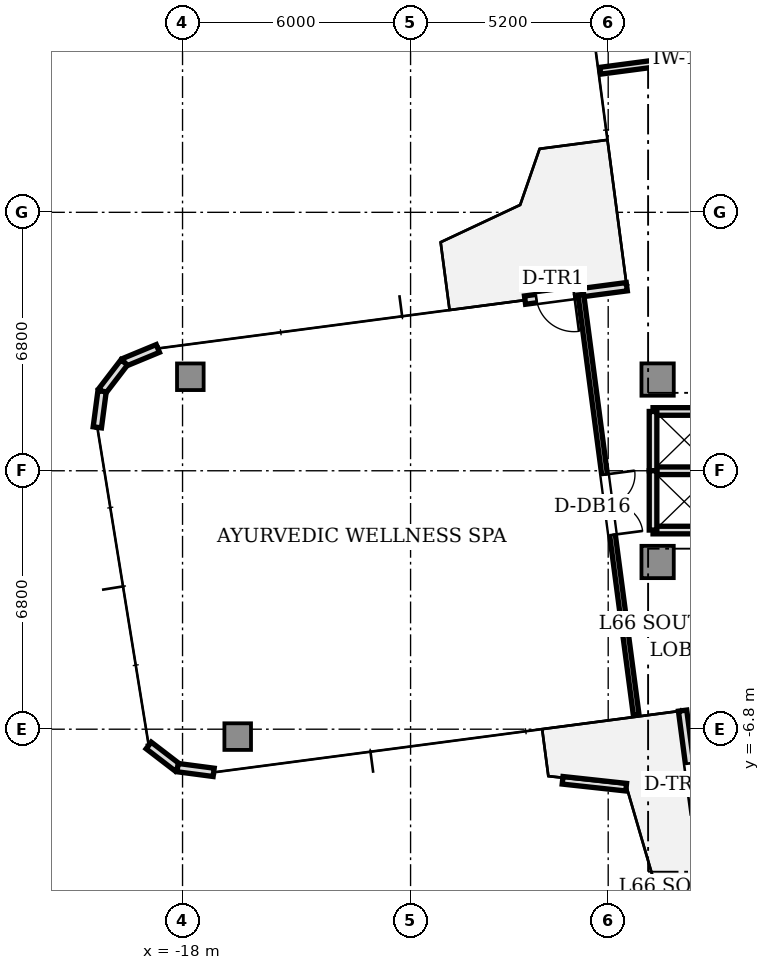
"""IFC4 building model, lengths in metres.
Left out: names, types, materials, properties, quantities, classifications, styles, units other than length and angle.
Written with IfcOpenShell. Run it as: python <this file> out.ifc"""

import sys

from ifc_helpers import new_model, si_unit, direction, frame, frame_2d, origin, origin_2d, place, context, subcontext, project, spatial, rectangle, extrude, source, transform, mapped, element, fill, save


model = new_model("IFC4")
c1 = context("Model", 3, precision=1e-05, world=origin(), true_north=direction((0.0, 1.0)))
c2 = subcontext(c1, "Body", "Model", "MODEL_VIEW")
j1 = project(units=[si_unit("LENGTHUNIT", "METRE"), si_unit("PLANEANGLEUNIT", "RADIAN")], contexts=[c1])
p1 = place(None, origin())
s1 = spatial("IfcSite", under=j1, at=p1, CompositionType="ELEMENT")
p2 = place(p1, origin())
s2 = spatial("IfcBuilding", under=s1, at=p2, CompositionType="ELEMENT")
p3 = place(p2, frame((0.0, 0.0, 237.8)))
s3 = spatial("IfcBuildingStorey", under=s2, at=p3, CompositionType="ELEMENT", Elevation=237.8)
m1 = source(origin(), c2, "Body", "SweptSolid", [
    extrude(rectangle(XDim=0.85, YDim=0.85, at=origin_2d()), origin(), (0.0, 0.0, 1.0), 3.11),
])
for number, where, z_axis, x_axis in (
    (1, (-5.5, 2.4, 0.0), (0.0, 0.0, 1.0), (1.0, 0.0, 0.0)),
    (2, (-5.5, -2.4, 0.0), (0.0, 0.0, 1.0), (1.0, 0.0, 0.0)),
):
    element("IfcColumn", number, at=place(p3, frame(where, z_axis=z_axis, x_axis=x_axis)), inside=s3, PredefinedType="COLUMN", context=c2, shape_type="MappedRepresentation", body=[
        mapped(m1, transform((0.0, 0.0, 0.0), scale=1.0)),
    ])
m2 = source(origin(), c2, "Body", "SweptSolid", [
    extrude(rectangle(XDim=0.7, YDim=0.7, at=origin_2d()), origin(), (0.0, 0.0, 1.0), 3.11),
])
for number, where, z_axis, x_axis in (
    (3, (-17.795, 2.473, 0.0), (0.0, 0.0, 1.0), (1.0, 0.0, 0.0)),
    (4, (-16.549, -6.995, 0.0), (0.0, 0.0, 1.0), (1.0, 0.0, 0.0)),
):
    element("IfcColumn", number, at=place(p3, frame(where, z_axis=z_axis, x_axis=x_axis)), inside=s3, PredefinedType="COLUMN", context=c2, shape_type="MappedRepresentation", body=[
        mapped(m2, transform((0.0, 0.0, 0.0), scale=1.0)),
    ])
p4 = place(p3, frame((-6.311, 4.843, 0.0), z_axis=(0.0, 0.0, 1.0), x_axis=(-0.991439824936, -0.130564442062, 0.0)))
e5 = element("IfcWall", 5, at=p4, inside=s3, PredefinedType="STANDARD", context=c2, shape_type="SweptSolid", body=[
    extrude(rectangle(XDim=2.7, YDim=0.22, at=frame_2d((1.35, 0.0))), origin(), (0.0, 0.0, 1.0), 3.11),
])
p5 = place(p4, frame((1.4, 0.0, 0.0)))
e6 = element("IfcOpeningElement", 6, at=p5, cuts=e5, PredefinedType="OPENING", context=c2, shape_type="SweptSolid", body=[
    extrude(rectangle(XDim=1.0, YDim=2.2, at=frame_2d((0.5, 1.1))), frame((0.0, 0.12, 0.0), z_axis=(0.0, -1.0, 0.0), x_axis=(1.0, 0.0, 0.0)), (0.0, 0.0, 1.0), 0.24),
])
p6 = place(p3, frame((-18.65, 3.218, 0.0), z_axis=(0.0, 0.0, 1.0), x_axis=(-0.923889442397, -0.382659506909, 0.0)))
e7 = element("IfcWall", 7, at=p6, inside=s3, PredefinedType="STANDARD", context=c2, shape_type="SweptSolid", body=[
    extrude(rectangle(XDim=0.958, YDim=0.22, at=frame_2d((0.479, 0.0))), origin(), (0.0, 0.0, 1.0), 3.11),
])
p7 = place(p3, frame((-19.534, 2.852, 0.0), z_axis=(0.0, 0.0, 1.0), x_axis=(-0.60861352168, -0.793466811674, 0.0)))
e8 = element("IfcWall", 8, at=p7, inside=s3, PredefinedType="STANDARD", context=c2, shape_type="SweptSolid", body=[
    extrude(rectangle(XDim=0.958, YDim=0.22, at=frame_2d((0.479, 0.0))), origin(), (0.0, 0.0, 1.0), 3.11),
])
for number, where, z_axis, x_axis in (
    (9, (-20.117, 2.092, 0.0), (0.0, 0.0, 1.0), (-0.131, -0.991, 0.0)),
    (10, (-18.89, -7.228, 0.0), (0.0, 0.0, 1.0), (0.793, -0.609, 0.0)),
    (11, (-18.131, -7.811, 0.0), (0.0, 0.0, 1.0), (0.991, -0.131, 0.0)),
):
    element("IfcWall", number, at=place(p3, frame(where, z_axis=z_axis, x_axis=x_axis)), inside=s3, PredefinedType="STANDARD", context=c2, shape_type="SweptSolid", body=[
        extrude(rectangle(XDim=0.958, YDim=0.22, at=frame_2d((0.479, 0.0))), origin(), (0.0, 0.0, 1.0), 3.11),
    ])
p8 = place(p3, frame((-4.843, -6.311, 0.0), z_axis=(0.0, 0.0, 1.0), x_axis=(0.130564442062, -0.991439824936, 0.0)))
e12 = element("IfcWall", 12, at=p8, inside=s3, PredefinedType="STANDARD", context=c2, shape_type="SweptSolid", body=[
    extrude(rectangle(XDim=2.7, YDim=0.22, at=frame_2d((1.35, 0.0))), origin(), (0.0, 0.0, 1.0), 3.11),
])
p9 = place(p8, frame((1.4, 0.0, 0.0)))
e13 = element("IfcOpeningElement", 13, at=p9, cuts=e12, PredefinedType="OPENING", context=c2, shape_type="SweptSolid", body=[
    extrude(rectangle(XDim=1.0, YDim=2.2, at=frame_2d((0.5, 1.1))), frame((0.0, 0.12, 0.0), z_axis=(0.0, -1.0, 0.0), x_axis=(1.0, 0.0, 0.0)), (0.0, 0.0, 1.0), 0.24),
])
p10 = place(p3, frame((-8.0, -8.145, 0.0), z_axis=(0.0, 0.0, 1.0), x_axis=(0.994167153372, -0.107850225574, 0.0)))
e14 = element("IfcWall", 14, at=p10, inside=s3, PredefinedType="PARAPET", context=c2, shape_type="SweptSolid", body=[
    extrude(rectangle(XDim=1.682, YDim=0.2, at=frame_2d((0.841, 0.0))), origin(), (0.0, 0.0, 1.0), 0.65),
])
for number, where, z_axis, x_axis in (
    (15, (-5.62, 1.56, 0.0), (0.0, 0.0, 1.0), (1.0, 0.0, 0.0)),
    (16, (-5.62, -1.56, 0.0), (0.0, 0.0, 1.0), (1.0, 0.0, 0.0)),
    (17, (-5.62, 0.0, 0.0), (0.0, 0.0, 1.0), (1.0, 0.0, 0.0)),
):
    element("IfcWall", number, at=place(p3, frame(where, z_axis=z_axis, x_axis=x_axis)), inside=s3, PredefinedType="SOLIDWALL", context=c2, shape_type="SweptSolid", body=[
        extrude(rectangle(XDim=1.64, YDim=0.2, at=frame_2d((0.82, 0.0))), origin(), (0.0, 0.0, 1.0), 2.66),
    ])
for number, where, z_axis, x_axis in (
    (18, (-5.62, 0.0, 0.0), (0.0, 0.0, 1.0), (0.0, 1.0, 0.0)),
    (19, (-5.62, -1.56, 0.0), (0.0, 0.0, 1.0), (0.0, 1.0, 0.0)),
):
    element("IfcWall", number, at=place(p3, frame(where, z_axis=z_axis, x_axis=x_axis)), inside=s3, PredefinedType="SOLIDWALL", context=c2, shape_type="SweptSolid", body=[
        extrude(rectangle(XDim=1.56, YDim=0.2, at=frame_2d((0.78, 0.0))), origin(), (0.0, 0.0, 1.0), 2.66),
    ])
p11 = place(p3, frame((-2.423, 11.129, 0.0), z_axis=(0.0, 0.0, 1.0), x_axis=(-0.991442792852, -0.130541903244, 0.0)))
e20 = element("IfcWall", 20, at=p11, inside=s3, PredefinedType="PARTITIONING", context=c2, shape_type="SweptSolid", body=[
    extrude(rectangle(XDim=4.625, YDim=0.18, at=frame_2d((2.312, 0.0))), origin(), (0.0, 0.0, 1.0), 2.66),
])
p12 = place(p3, frame((-7.519, 4.633, 0.0), z_axis=(0.0, 0.0, 1.0), x_axis=(0.130521347626, -0.991445499165, 0.0)))
e21 = element("IfcWall", 21, at=p12, inside=s3, PredefinedType="PARTITIONING", context=c2, shape_type="SweptSolid", body=[
    extrude(rectangle(XDim=11.15, YDim=0.15, at=frame_2d((5.575, 0.0))), origin(), (0.0, 0.0, 1.0), 2.66),
])
p13 = place(p12, frame((4.775, 0.0, 0.0)))
e22 = element("IfcOpeningElement", 22, at=p13, cuts=e21, PredefinedType="OPENING", context=c2, shape_type="SweptSolid", body=[
    extrude(rectangle(XDim=1.6, YDim=2.25, at=frame_2d((0.8, 1.125))), frame((0.0, 0.085, 0.0), z_axis=(0.0, -1.0, 0.0), x_axis=(1.0, 0.0, 0.0)), (0.0, 0.0, 1.0), 0.17),
])
m3 = source(origin(), c2, "Body", "SweptSolid", [
    extrude(rectangle(XDim=1.0, YDim=0.05, at=origin_2d()), origin(), (0.0, 0.0, 1.0), 2.2),
])
p14 = place(p5, frame((0.5, 0.0, 0.0)))
e23 = element("IfcDoor", 23, at=p14, inside=s3, OperationType="SINGLE_SWING_LEFT", PredefinedType="DOOR", context=c2, shape_type="MappedRepresentation", body=[
    mapped(m3, transform((0.0, 0.0, 0.0), scale=1.0)),
])
fill(e6, e23)
p15 = place(p9, frame((0.5, 0.0, 0.0)))
e24 = element("IfcDoor", 24, at=p15, inside=s3, OperationType="SINGLE_SWING_LEFT", PredefinedType="DOOR", context=c2, shape_type="MappedRepresentation", body=[
    mapped(m3, transform((0.0, 0.0, 0.0), scale=1.0)),
])
fill(e13, e24)
m4 = source(origin(), c2, "Body", "SweptSolid", [
    extrude(rectangle(XDim=1.6, YDim=0.05, at=origin_2d()), origin(), (0.0, 0.0, 1.0), 2.25),
])
p16 = place(p13, frame((0.8, 0.0, 0.0)))
e25 = element("IfcDoor", 25, at=p16, inside=s3, OperationType="DOUBLE_DOOR_SINGLE_SWING", PredefinedType="DOOR", context=c2, shape_type="MappedRepresentation", body=[
    mapped(m4, transform((0.0, 0.0, 0.0), scale=1.0)),
])
fill(e22, e25)
save(model, sys.argv[1])
